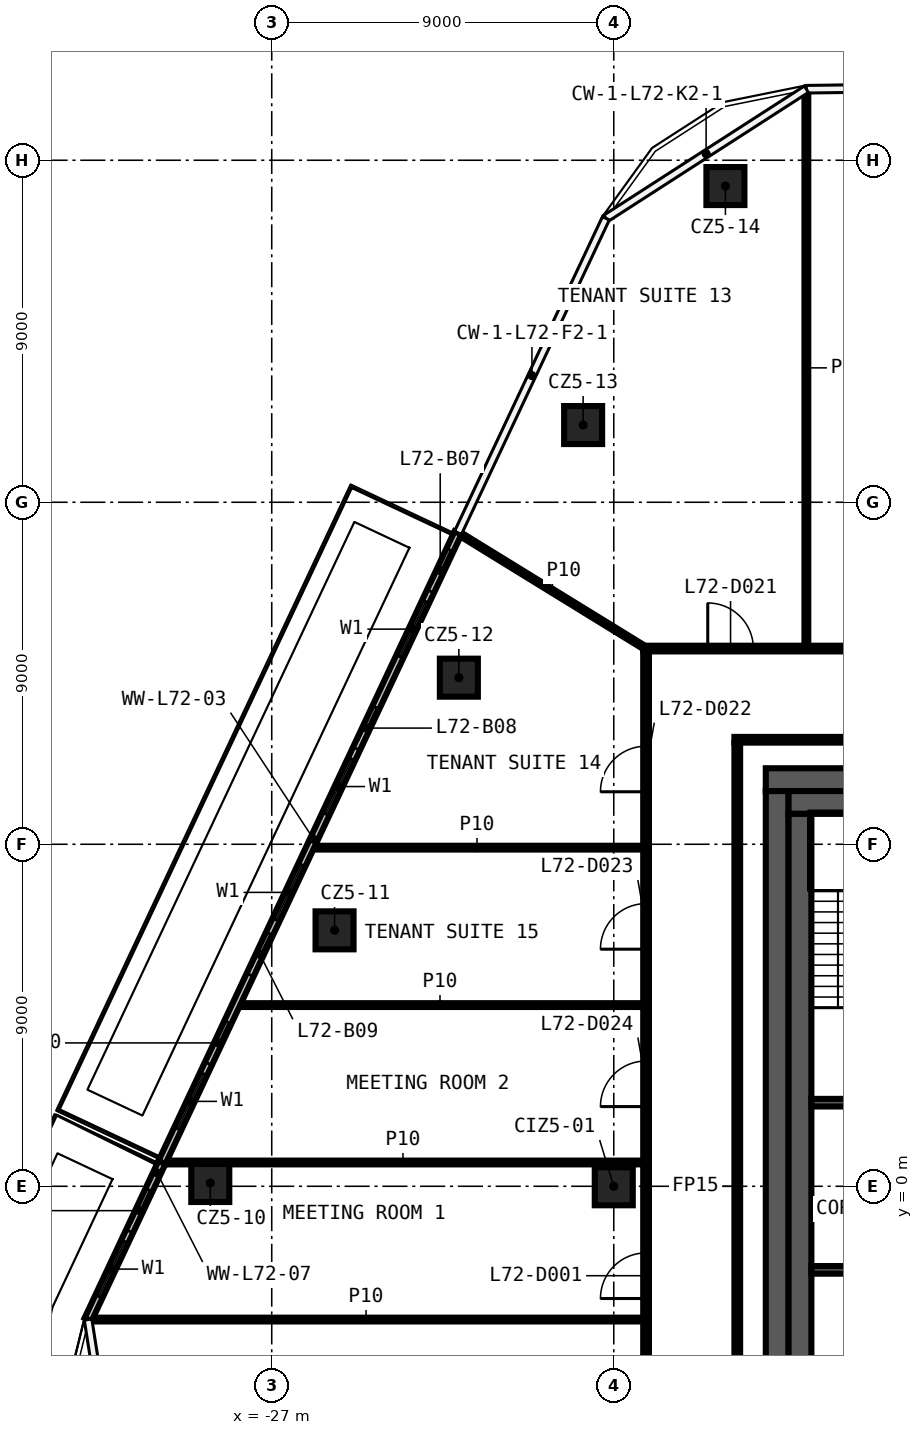
"""IFC4 building model, lengths in metres.
Left out: names, types, materials, properties, quantities, classifications, styles, units other than length and angle.
Written with IfcOpenShell. Run it as: python <this file> out.ifc"""

import sys

from ifc_helpers import new_model, si_unit, direction, frame, frame_2d, origin, origin_2d, place, context, subcontext, project, spatial, rectangle, extrude, element, fill, save


model = new_model("IFC4")
c1 = context("Model", 3, precision=1e-05, world=origin(), true_north=direction((0.0, 1.0)))
c2 = subcontext(c1, "Body", "Model", "MODEL_VIEW")
j1 = project(units=[si_unit("LENGTHUNIT", "METRE"), si_unit("PLANEANGLEUNIT", "RADIAN")], contexts=[c1])
p1 = place(None, origin())
s1 = spatial("IfcSite", under=j1, at=p1, CompositionType="ELEMENT")
p2 = place(p1, origin())
s2 = spatial("IfcBuilding", under=s1, at=p2, CompositionType="ELEMENT")
p3 = place(p2, frame((0.0, 0.0, 336.2)))
s3 = spatial("IfcBuildingStorey", under=s2, at=p3, CompositionType="ELEMENT", Elevation=336.2)
for number, where, z_axis, x_axis in (
    (1, (-28.617, 0.086, 0.0), (0.0, 0.0, 1.0), (1.0, 0.0, 0.0)),
    (2, (-25.347, 6.735, 0.0), (0.0, 0.0, 1.0), (1.0, 0.0, 0.0)),
    (3, (-22.076, 13.384, 0.0), (0.0, 0.0, 1.0), (1.0, 0.0, 0.0)),
    (4, (-18.806, 20.032, 0.0), (0.0, 0.0, 1.0), (1.0, 0.0, 0.0)),
    (5, (-15.062, 26.321, 0.0), (0.0, 0.0, 1.0), (1.0, 0.0, 0.0)),
    (6, (-18.0, 0.0, 0.0), (0.0, 0.0, 1.0), (1.0, 0.0, 0.0)),
):
    element("IfcColumn", number, at=place(p3, frame(where, z_axis=z_axis, x_axis=x_axis)), inside=s3, PredefinedType="COLUMN", context=c2, shape_type="SweptSolid", body=[
        extrude(rectangle(XDim=1.0, YDim=1.0, at=origin_2d()), origin(), (0.0, 0.0, 1.0), 3.82),
    ])
p4 = place(p3, frame((-31.811, -3.507, 0.0), z_axis=(0.0, 0.0, 1.0), x_axis=(1.0, 0.0, 0.0)))
e7 = element("IfcWall", 7, at=p4, inside=s3, PredefinedType="PARTITIONING", context=c2, shape_type="SweptSolid", body=[
    extrude(rectangle(XDim=14.586, YDim=0.1, at=frame_2d((7.293, 0.0))), origin(), (0.0, 0.0, 1.0), 3.82),
])
p5 = place(p3, frame((-29.867, 0.626, 0.0), z_axis=(0.0, 0.0, 1.0), x_axis=(1.0, 0.0, 0.0)))
e8 = element("IfcWall", 8, at=p5, inside=s3, PredefinedType="PARTITIONING", context=c2, shape_type="SweptSolid", body=[
    extrude(rectangle(XDim=12.642, YDim=0.1, at=frame_2d((6.321, 0.0))), origin(), (0.0, 0.0, 1.0), 3.82),
])
p6 = place(p3, frame((-27.92, 4.768, 0.0), z_axis=(0.0, 0.0, 1.0), x_axis=(1.0, 0.0, 0.0)))
e9 = element("IfcWall", 9, at=p6, inside=s3, PredefinedType="PARTITIONING", context=c2, shape_type="SweptSolid", body=[
    extrude(rectangle(XDim=10.695, YDim=0.1, at=frame_2d((5.347, 0.0))), origin(), (0.0, 0.0, 1.0), 3.82),
])
p7 = place(p3, frame((-25.972, 8.911, 0.0), z_axis=(0.0, 0.0, 1.0), x_axis=(1.0, 0.0, 0.0)))
e10 = element("IfcWall", 10, at=p7, inside=s3, PredefinedType="PARTITIONING", context=c2, shape_type="SweptSolid", body=[
    extrude(rectangle(XDim=8.747, YDim=0.1, at=frame_2d((4.374, 0.0))), origin(), (0.0, 0.0, 1.0), 3.82),
])
p8 = place(p3, frame((-14.825, 11.75, 0.0), z_axis=(0.0, 0.0, 1.0), x_axis=(1.0, 0.0, 0.0)))
e11 = element("IfcWall", 11, at=p8, inside=s3, PredefinedType="PARTITIONING", context=c2, shape_type="SweptSolid", body=[
    extrude(rectangle(XDim=16.625, YDim=0.15, at=frame_2d((8.312, 0.0))), origin(), (0.0, 0.0, 1.0), 3.82),
])
p9 = place(p3, frame((-17.225, 14.15, 0.0), z_axis=(0.0, 0.0, 1.0), x_axis=(1.0, 0.0, 0.0)))
e12 = element("IfcWall", 12, at=p9, inside=s3, PredefinedType="PARTITIONING", context=c2, shape_type="SweptSolid", body=[
    extrude(rectangle(XDim=34.45, YDim=0.15, at=frame_2d((17.225, 0.0))), origin(), (0.0, 0.0, 1.0), 3.82),
])
p10 = place(p9, frame((24.708, 0.0, 0.0)))
e13 = element("IfcOpeningElement", 13, at=p10, cuts=e12, PredefinedType="OPENING", context=c2, shape_type="SweptSolid", body=[
    extrude(rectangle(XDim=1.2, YDim=2.1, at=frame_2d((0.6, 1.05))), frame((0.0, 0.085, 0.0), z_axis=(0.0, -1.0, 0.0), x_axis=(1.0, 0.0, 0.0)), (0.0, 0.0, 1.0), 0.17),
])
p11 = place(p9, frame((20.038, 0.0, 0.0)))
e14 = element("IfcOpeningElement", 14, at=p11, cuts=e12, PredefinedType="OPENING", context=c2, shape_type="SweptSolid", body=[
    extrude(rectangle(XDim=1.2, YDim=2.1, at=frame_2d((0.6, 1.05))), frame((0.0, 0.085, 0.0), z_axis=(0.0, -1.0, 0.0), x_axis=(1.0, 0.0, 0.0)), (0.0, 0.0, 1.0), 0.17),
])
p12 = place(p9, frame((15.367, 0.0, 0.0)))
e15 = element("IfcOpeningElement", 15, at=p12, cuts=e12, PredefinedType="OPENING", context=c2, shape_type="SweptSolid", body=[
    extrude(rectangle(XDim=1.2, YDim=2.1, at=frame_2d((0.6, 1.05))), frame((0.0, 0.085, 0.0), z_axis=(0.0, -1.0, 0.0), x_axis=(1.0, 0.0, 0.0)), (0.0, 0.0, 1.0), 0.17),
])
p13 = place(p9, frame((10.695, 0.0, 0.0)))
e16 = element("IfcOpeningElement", 16, at=p13, cuts=e12, PredefinedType="OPENING", context=c2, shape_type="SweptSolid", body=[
    extrude(rectangle(XDim=1.2, YDim=2.1, at=frame_2d((0.6, 1.05))), frame((0.0, 0.085, 0.0), z_axis=(0.0, -1.0, 0.0), x_axis=(1.0, 0.0, 0.0)), (0.0, 0.0, 1.0), 0.17),
])
p14 = place(p9, frame((6.025, 0.0, 0.0)))
e17 = element("IfcOpeningElement", 17, at=p14, cuts=e12, PredefinedType="OPENING", context=c2, shape_type="SweptSolid", body=[
    extrude(rectangle(XDim=1.2, YDim=2.1, at=frame_2d((0.6, 1.05))), frame((0.0, 0.085, 0.0), z_axis=(0.0, -1.0, 0.0), x_axis=(1.0, 0.0, 0.0)), (0.0, 0.0, 1.0), 0.17),
])
p15 = place(p9, frame((1.698, 0.0, 0.0)))
e18 = element("IfcOpeningElement", 18, at=p15, cuts=e12, PredefinedType="OPENING", context=c2, shape_type="SweptSolid", body=[
    extrude(rectangle(XDim=1.2, YDim=2.1, at=frame_2d((0.6, 1.05))), frame((0.0, 0.085, 0.0), z_axis=(0.0, -1.0, 0.0), x_axis=(1.0, 0.0, 0.0)), (0.0, 0.0, 1.0), 0.17),
])
p16 = place(p3, frame((-12.932, 14.225, 0.0), z_axis=(0.0, 0.0, 1.0), x_axis=(0.0, 1.0, 0.0)))
e19 = element("IfcWall", 19, at=p16, inside=s3, PredefinedType="PARTITIONING", context=c2, shape_type="SweptSolid", body=[
    extrude(rectangle(XDim=14.624, YDim=0.1, at=frame_2d((7.312, 0.0))), origin(), (0.0, 0.0, 1.0), 3.82),
])
p17 = place(p3, frame((-14.75, -11.675, 0.0), z_axis=(0.0, 0.0, 1.0), x_axis=(0.0, 1.0, 0.0)))
e20 = element("IfcWall", 20, at=p17, inside=s3, PredefinedType="PARTITIONING", context=c2, shape_type="SweptSolid", body=[
    extrude(rectangle(XDim=23.35, YDim=0.15, at=frame_2d((11.675, 0.0))), origin(), (0.0, 0.0, 1.0), 3.82),
])
p18 = place(p3, frame((-17.15, -14.075, 0.0), z_axis=(0.0, 0.0, 1.0), x_axis=(0.0, 1.0, 0.0)))
e21 = element("IfcWall", 21, at=p18, inside=s3, PredefinedType="PARTITIONING", context=c2, shape_type="SweptSolid", body=[
    extrude(rectangle(XDim=28.15, YDim=0.15, at=frame_2d((14.075, 0.0))), origin(), (0.0, 0.0, 1.0), 3.82),
])
p19 = place(p18, frame((11.122, 0.0, 0.0)))
e22 = element("IfcOpeningElement", 22, at=p19, cuts=e21, PredefinedType="OPENING", context=c2, shape_type="SweptSolid", body=[
    extrude(rectangle(XDim=1.2, YDim=2.1, at=frame_2d((0.6, 1.05))), frame((0.0, 0.085, 0.0), z_axis=(0.0, -1.0, 0.0), x_axis=(1.0, 0.0, 0.0)), (0.0, 0.0, 1.0), 0.17),
])
p20 = place(p18, frame((5.555, 0.0, 0.0)))
e23 = element("IfcOpeningElement", 23, at=p20, cuts=e21, PredefinedType="OPENING", context=c2, shape_type="SweptSolid", body=[
    extrude(rectangle(XDim=1.2, YDim=2.1, at=frame_2d((0.6, 1.05))), frame((0.0, 0.085, 0.0), z_axis=(0.0, -1.0, 0.0), x_axis=(1.0, 0.0, 0.0)), (0.0, 0.0, 1.0), 0.17),
])
p21 = place(p18, frame((1.7, 0.0, 0.0)))
e24 = element("IfcOpeningElement", 24, at=p21, cuts=e21, PredefinedType="OPENING", context=c2, shape_type="SweptSolid", body=[
    extrude(rectangle(XDim=1.2, YDim=2.1, at=frame_2d((0.6, 1.05))), frame((0.0, 0.085, 0.0), z_axis=(0.0, -1.0, 0.0), x_axis=(1.0, 0.0, 0.0)), (0.0, 0.0, 1.0), 0.17),
])
p22 = place(p18, frame((24.457, 0.0, 0.0)))
e25 = element("IfcOpeningElement", 25, at=p22, cuts=e21, PredefinedType="OPENING", context=c2, shape_type="SweptSolid", body=[
    extrude(rectangle(XDim=1.2, YDim=2.1, at=frame_2d((0.6, 1.05))), frame((0.0, 0.085, 0.0), z_axis=(0.0, -1.0, 0.0), x_axis=(1.0, 0.0, 0.0)), (0.0, 0.0, 1.0), 0.17),
])
p23 = place(p18, frame((20.314, 0.0, 0.0)))
e26 = element("IfcOpeningElement", 26, at=p23, cuts=e21, PredefinedType="OPENING", context=c2, shape_type="SweptSolid", body=[
    extrude(rectangle(XDim=1.2, YDim=2.1, at=frame_2d((0.6, 1.05))), frame((0.0, 0.085, 0.0), z_axis=(0.0, -1.0, 0.0), x_axis=(1.0, 0.0, 0.0)), (0.0, 0.0, 1.0), 0.17),
])
p24 = place(p18, frame((16.172, 0.0, 0.0)))
e27 = element("IfcOpeningElement", 27, at=p24, cuts=e21, PredefinedType="OPENING", context=c2, shape_type="SweptSolid", body=[
    extrude(rectangle(XDim=1.2, YDim=2.1, at=frame_2d((0.6, 1.05))), frame((0.0, 0.085, 0.0), z_axis=(0.0, -1.0, 0.0), x_axis=(1.0, 0.0, 0.0)), (0.0, 0.0, 1.0), 0.17),
])
p25 = place(p3, frame((-22.081, 17.185, 0.0), z_axis=(0.0, 0.0, 1.0), x_axis=(0.85162357217, -0.524153881341, 0.0)))
e28 = element("IfcWall", 28, at=p25, inside=s3, PredefinedType="PARTITIONING", context=c2, shape_type="SweptSolid", body=[
    extrude(rectangle(XDim=5.791, YDim=0.1, at=frame_2d((2.895, 0.0))), origin(), (0.0, 0.0, 1.0), 3.82),
])
p26 = place(p3, frame((-22.099, 17.195, 0.0), z_axis=(0.0, 0.0, 1.0), x_axis=(-0.425492631057, -0.904961889206, 0.0)))
e29 = element("IfcWall", 29, at=p26, inside=s3, PredefinedType="SOLIDWALL", context=c2, shape_type="SweptSolid", body=[
    extrude(rectangle(XDim=18.309, YDim=0.2, at=frame_2d((9.155, 0.0))), origin(), (0.0, 0.0, 1.0), 3.82),
])
p27 = place(p26, frame((2.0, 0.0, 0.6)))
e30 = element("IfcOpeningElement", 30, at=p27, cuts=e29, PredefinedType="OPENING", context=c2, shape_type="SweptSolid", body=[
    extrude(rectangle(XDim=1.6, YDim=2.4, at=frame_2d((0.8, 1.2))), frame((0.0, 0.11, 0.0), z_axis=(0.0, -1.0, 0.0), x_axis=(1.0, 0.0, 0.0)), (0.0, 0.0, 1.0), 0.22),
])
p28 = place(p26, frame((0.5, 0.0, 0.0)))
e31 = element("IfcOpeningElement", 31, at=p28, cuts=e29, PredefinedType="OPENING", context=c2, shape_type="SweptSolid", body=[
    extrude(rectangle(XDim=1.2, YDim=2.4, at=frame_2d((0.6, 1.2))), frame((0.0, 0.11, 0.0), z_axis=(0.0, -1.0, 0.0), x_axis=(1.0, 0.0, 0.0)), (0.0, 0.0, 1.0), 0.22),
])
p29 = place(p26, frame((6.577, 0.0, 0.6)))
e32 = element("IfcOpeningElement", 32, at=p29, cuts=e29, PredefinedType="OPENING", context=c2, shape_type="SweptSolid", body=[
    extrude(rectangle(XDim=1.6, YDim=2.4, at=frame_2d((0.8, 1.2))), frame((0.0, 0.11, 0.0), z_axis=(0.0, -1.0, 0.0), x_axis=(1.0, 0.0, 0.0)), (0.0, 0.0, 1.0), 0.22),
])
p30 = place(p26, frame((5.077, 0.0, 0.0)))
e33 = element("IfcOpeningElement", 33, at=p30, cuts=e29, PredefinedType="OPENING", context=c2, shape_type="SweptSolid", body=[
    extrude(rectangle(XDim=1.2, YDim=2.4, at=frame_2d((0.6, 1.2))), frame((0.0, 0.11, 0.0), z_axis=(0.0, -1.0, 0.0), x_axis=(1.0, 0.0, 0.0)), (0.0, 0.0, 1.0), 0.22),
])
p31 = place(p26, frame((9.655, 0.0, 0.6)))
e34 = element("IfcOpeningElement", 34, at=p31, cuts=e29, PredefinedType="OPENING", context=c2, shape_type="SweptSolid", body=[
    extrude(rectangle(XDim=1.6, YDim=2.4, at=frame_2d((0.8, 1.2))), frame((0.0, 0.11, 0.0), z_axis=(0.0, -1.0, 0.0), x_axis=(1.0, 0.0, 0.0)), (0.0, 0.0, 1.0), 0.22),
])
p32 = place(p26, frame((11.655, 0.0, 0.0)))
e35 = element("IfcOpeningElement", 35, at=p32, cuts=e29, PredefinedType="OPENING", context=c2, shape_type="SweptSolid", body=[
    extrude(rectangle(XDim=1.2, YDim=2.4, at=frame_2d((0.6, 1.2))), frame((0.0, 0.11, 0.0), z_axis=(0.0, -1.0, 0.0), x_axis=(1.0, 0.0, 0.0)), (0.0, 0.0, 1.0), 0.22),
])
p33 = place(p26, frame((15.732, 0.0, 0.6)))
e36 = element("IfcOpeningElement", 36, at=p33, cuts=e29, PredefinedType="OPENING", context=c2, shape_type="SweptSolid", body=[
    extrude(rectangle(XDim=1.6, YDim=2.4, at=frame_2d((0.8, 1.2))), frame((0.0, 0.11, 0.0), z_axis=(0.0, -1.0, 0.0), x_axis=(1.0, 0.0, 0.0)), (0.0, 0.0, 1.0), 0.22),
])
p34 = place(p26, frame((14.232, 0.0, 0.0)))
e37 = element("IfcOpeningElement", 37, at=p34, cuts=e29, PredefinedType="OPENING", context=c2, shape_type="SweptSolid", body=[
    extrude(rectangle(XDim=1.2, YDim=2.4, at=frame_2d((0.6, 1.2))), frame((0.0, 0.11, 0.0), z_axis=(0.0, -1.0, 0.0), x_axis=(1.0, 0.0, 0.0)), (0.0, 0.0, 1.0), 0.22),
])
p35 = place(p3, frame((-29.889, 0.626, 0.0), z_axis=(0.0, 0.0, 1.0), x_axis=(-0.425531877643, -0.904943435309, 0.0)))
e38 = element("IfcWall", 38, at=p35, inside=s3, PredefinedType="SOLIDWALL", context=c2, shape_type="SweptSolid", body=[
    extrude(rectangle(XDim=4.567, YDim=0.2, at=frame_2d((2.284, 0.0))), origin(), (0.0, 0.0, 1.0), 3.82),
])
p36 = place(p35, frame((2.3, 0.0, 0.6)))
e39 = element("IfcOpeningElement", 39, at=p36, cuts=e38, PredefinedType="OPENING", context=c2, shape_type="SweptSolid", body=[
    extrude(rectangle(XDim=1.6, YDim=2.4, at=frame_2d((0.8, 1.2))), frame((0.0, 0.11, 0.0), z_axis=(0.0, -1.0, 0.0), x_axis=(1.0, 0.0, 0.0)), (0.0, 0.0, 1.0), 0.22),
])
p37 = place(p35, frame((0.8, 0.0, 0.0)))
e40 = element("IfcOpeningElement", 40, at=p37, cuts=e38, PredefinedType="OPENING", context=c2, shape_type="SweptSolid", body=[
    extrude(rectangle(XDim=1.2, YDim=2.4, at=frame_2d((0.6, 1.2))), frame((0.0, 0.11, 0.0), z_axis=(0.0, -1.0, 0.0), x_axis=(1.0, 0.0, 0.0)), (0.0, 0.0, 1.0), 0.22),
])
p38 = place(p3, frame((-14.0, 10.7, 0.0), z_axis=(0.0, 0.0, 1.0), x_axis=(1.0, 0.0, 0.0)))
e41 = element("IfcWall", 41, at=p38, inside=s3, PredefinedType="SHEAR", context=c2, shape_type="SweptSolid", body=[
    extrude(rectangle(XDim=28.0, YDim=0.6, at=frame_2d((14.0, 0.0))), origin(), (0.0, 0.0, 1.0), 3.82),
])
p39 = place(p38, frame((15.9, 0.0, 0.0)))
e42 = element("IfcOpeningElement", 42, at=p39, cuts=e41, PredefinedType="OPENING", context=c2, shape_type="SweptSolid", body=[
    extrude(rectangle(XDim=1.6, YDim=2.1, at=frame_2d((0.8, 1.05))), frame((0.0, 0.31, 0.0), z_axis=(0.0, -1.0, 0.0), x_axis=(1.0, 0.0, 0.0)), (0.0, 0.0, 1.0), 0.62),
])
p40 = place(p3, frame((-13.7, -10.4, 0.0), z_axis=(0.0, 0.0, 1.0), x_axis=(0.0, 1.0, 0.0)))
e43 = element("IfcWall", 43, at=p40, inside=s3, PredefinedType="SHEAR", context=c2, shape_type="SweptSolid", body=[
    extrude(rectangle(XDim=20.8, YDim=0.6, at=frame_2d((10.4, 0.0))), origin(), (0.0, 0.0, 1.0), 3.82),
])
p41 = place(p3, frame((-13.4, 10.1, 0.0), z_axis=(0.0, 0.0, 1.0), x_axis=(1.0, 0.0, 0.0)))
e44 = element("IfcWall", 44, at=p41, inside=s3, PredefinedType="SHEAR", context=c2, shape_type="SweptSolid", body=[
    extrude(rectangle(XDim=14.9, YDim=0.6, at=frame_2d((7.45, 0.0))), origin(), (0.0, 0.0, 1.0), 3.82),
])
p42 = place(p3, frame((-13.1, -9.8, 0.0), z_axis=(0.0, 0.0, 1.0), x_axis=(0.0, 1.0, 0.0)))
e45 = element("IfcWall", 45, at=p42, inside=s3, PredefinedType="SHEAR", context=c2, shape_type="SweptSolid", body=[
    extrude(rectangle(XDim=19.6, YDim=0.6, at=frame_2d((9.8, 0.0))), origin(), (0.0, 0.0, 1.0), 3.82),
])
for number, where, z_axis, x_axis in (
    (46, (-9.45, 2.2, 0.0), (0.0, 0.0, 1.0), (-1.0, 0.0, 0.0)),
    (47, (-9.45, -2.2, 0.0), (0.0, 0.0, 1.0), (-1.0, 0.0, 0.0)),
):
    element("IfcWall", number, at=place(p3, frame(where, z_axis=z_axis, x_axis=x_axis)), inside=s3, PredefinedType="SHEAR", context=c2, shape_type="SweptSolid", body=[
        extrude(rectangle(XDim=3.35, YDim=0.2, at=frame_2d((1.675, 0.0))), origin(), (0.0, 0.0, 1.0), 3.82),
    ])
p43 = place(p19, origin())
e48 = element("IfcDoor", 48, at=p43, inside=s3, OperationType="SINGLE_SWING_RIGHT", PredefinedType="DOOR", context=c2, shape_type="SweptSolid", body=[
    extrude(rectangle(XDim=1.2, YDim=2.1, at=frame_2d((0.6, 1.05))), frame((0.0, 0.025, 0.0), z_axis=(0.0, -1.0, 0.0), x_axis=(1.0, 0.0, 0.0)), (0.0, 0.0, 1.0), 0.05),
])
fill(e22, e48)
p44 = place(p15, origin())
e49 = element("IfcDoor", 49, at=p44, inside=s3, OperationType="SINGLE_SWING_RIGHT", PredefinedType="DOOR", context=c2, shape_type="SweptSolid", body=[
    extrude(rectangle(XDim=1.2, YDim=2.1, at=frame_2d((0.6, 1.05))), frame((0.0, 0.025, 0.0), z_axis=(0.0, -1.0, 0.0), x_axis=(1.0, 0.0, 0.0)), (0.0, 0.0, 1.0), 0.05),
])
fill(e18, e49)
p45 = place(p22, origin())
e50 = element("IfcDoor", 50, at=p45, inside=s3, OperationType="SINGLE_SWING_LEFT", PredefinedType="DOOR", context=c2, shape_type="SweptSolid", body=[
    extrude(rectangle(XDim=1.2, YDim=2.1, at=frame_2d((0.6, 1.05))), frame((0.0, 0.025, 0.0), z_axis=(0.0, -1.0, 0.0), x_axis=(1.0, 0.0, 0.0)), (0.0, 0.0, 1.0), 0.05),
])
fill(e25, e50)
p46 = place(p23, origin())
e51 = element("IfcDoor", 51, at=p46, inside=s3, OperationType="SINGLE_SWING_RIGHT", PredefinedType="DOOR", context=c2, shape_type="SweptSolid", body=[
    extrude(rectangle(XDim=1.2, YDim=2.1, at=frame_2d((0.6, 1.05))), frame((0.0, 0.025, 0.0), z_axis=(0.0, -1.0, 0.0), x_axis=(1.0, 0.0, 0.0)), (0.0, 0.0, 1.0), 0.05),
])
fill(e26, e51)
p47 = place(p24, origin())
e52 = element("IfcDoor", 52, at=p47, inside=s3, OperationType="SINGLE_SWING_LEFT", PredefinedType="DOOR", context=c2, shape_type="SweptSolid", body=[
    extrude(rectangle(XDim=1.2, YDim=2.1, at=frame_2d((0.6, 1.05))), frame((0.0, 0.025, 0.0), z_axis=(0.0, -1.0, 0.0), x_axis=(1.0, 0.0, 0.0)), (0.0, 0.0, 1.0), 0.05),
])
fill(e27, e52)
p48 = place(p27, origin())
e53 = element("IfcWindow", 53, at=p48, inside=s3, PartitioningType="SINGLE_PANEL", PredefinedType="WINDOW", context=c2, shape_type="SweptSolid", body=[
    extrude(rectangle(XDim=1.6, YDim=2.4, at=frame_2d((0.8, 1.2))), frame((0.0, 0.03, 0.0), z_axis=(0.0, -1.0, 0.0), x_axis=(1.0, 0.0, 0.0)), (0.0, 0.0, 1.0), 0.06),
])
fill(e30, e53)
p49 = place(p28, origin())
e54 = element("IfcDoor", 54, at=p49, inside=s3, OperationType="SLIDING_TO_LEFT", PredefinedType="DOOR", context=c2, shape_type="SweptSolid", body=[
    extrude(rectangle(XDim=1.2, YDim=2.4, at=frame_2d((0.6, 1.2))), frame((0.0, 0.025, 0.0), z_axis=(0.0, -1.0, 0.0), x_axis=(1.0, 0.0, 0.0)), (0.0, 0.0, 1.0), 0.05),
])
fill(e31, e54)
p50 = place(p29, origin())
e55 = element("IfcWindow", 55, at=p50, inside=s3, PartitioningType="SINGLE_PANEL", PredefinedType="WINDOW", context=c2, shape_type="SweptSolid", body=[
    extrude(rectangle(XDim=1.6, YDim=2.4, at=frame_2d((0.8, 1.2))), frame((0.0, 0.03, 0.0), z_axis=(0.0, -1.0, 0.0), x_axis=(1.0, 0.0, 0.0)), (0.0, 0.0, 1.0), 0.06),
])
fill(e32, e55)
p51 = place(p30, origin())
e56 = element("IfcDoor", 56, at=p51, inside=s3, OperationType="SLIDING_TO_LEFT", PredefinedType="DOOR", context=c2, shape_type="SweptSolid", body=[
    extrude(rectangle(XDim=1.2, YDim=2.4, at=frame_2d((0.6, 1.2))), frame((0.0, 0.025, 0.0), z_axis=(0.0, -1.0, 0.0), x_axis=(1.0, 0.0, 0.0)), (0.0, 0.0, 1.0), 0.05),
])
fill(e33, e56)
p52 = place(p31, origin())
e57 = element("IfcWindow", 57, at=p52, inside=s3, PartitioningType="SINGLE_PANEL", PredefinedType="WINDOW", context=c2, shape_type="SweptSolid", body=[
    extrude(rectangle(XDim=1.6, YDim=2.4, at=frame_2d((0.8, 1.2))), frame((0.0, 0.03, 0.0), z_axis=(0.0, -1.0, 0.0), x_axis=(1.0, 0.0, 0.0)), (0.0, 0.0, 1.0), 0.06),
])
fill(e34, e57)
p53 = place(p32, origin())
e58 = element("IfcDoor", 58, at=p53, inside=s3, OperationType="SLIDING_TO_LEFT", PredefinedType="DOOR", context=c2, shape_type="SweptSolid", body=[
    extrude(rectangle(XDim=1.2, YDim=2.4, at=frame_2d((0.6, 1.2))), frame((0.0, 0.025, 0.0), z_axis=(0.0, -1.0, 0.0), x_axis=(1.0, 0.0, 0.0)), (0.0, 0.0, 1.0), 0.05),
])
fill(e35, e58)
p54 = place(p33, origin())
e59 = element("IfcWindow", 59, at=p54, inside=s3, PartitioningType="SINGLE_PANEL", PredefinedType="WINDOW", context=c2, shape_type="SweptSolid", body=[
    extrude(rectangle(XDim=1.6, YDim=2.4, at=frame_2d((0.8, 1.2))), frame((0.0, 0.03, 0.0), z_axis=(0.0, -1.0, 0.0), x_axis=(1.0, 0.0, 0.0)), (0.0, 0.0, 1.0), 0.06),
])
fill(e36, e59)
p55 = place(p34, origin())
e60 = element("IfcDoor", 60, at=p55, inside=s3, OperationType="SLIDING_TO_LEFT", PredefinedType="DOOR", context=c2, shape_type="SweptSolid", body=[
    extrude(rectangle(XDim=1.2, YDim=2.4, at=frame_2d((0.6, 1.2))), frame((0.0, 0.025, 0.0), z_axis=(0.0, -1.0, 0.0), x_axis=(1.0, 0.0, 0.0)), (0.0, 0.0, 1.0), 0.05),
])
fill(e37, e60)
p56 = place(p36, origin())
e61 = element("IfcWindow", 61, at=p56, inside=s3, PartitioningType="SINGLE_PANEL", PredefinedType="WINDOW", context=c2, shape_type="SweptSolid", body=[
    extrude(rectangle(XDim=1.6, YDim=2.4, at=frame_2d((0.8, 1.2))), frame((0.0, 0.03, 0.0), z_axis=(0.0, -1.0, 0.0), x_axis=(1.0, 0.0, 0.0)), (0.0, 0.0, 1.0), 0.06),
])
fill(e39, e61)
p57 = place(p37, origin())
e62 = element("IfcDoor", 62, at=p57, inside=s3, OperationType="SLIDING_TO_LEFT", PredefinedType="DOOR", context=c2, shape_type="SweptSolid", body=[
    extrude(rectangle(XDim=1.2, YDim=2.4, at=frame_2d((0.6, 1.2))), frame((0.0, 0.025, 0.0), z_axis=(0.0, -1.0, 0.0), x_axis=(1.0, 0.0, 0.0)), (0.0, 0.0, 1.0), 0.05),
])
fill(e40, e62)
save(model, sys.argv[1])
